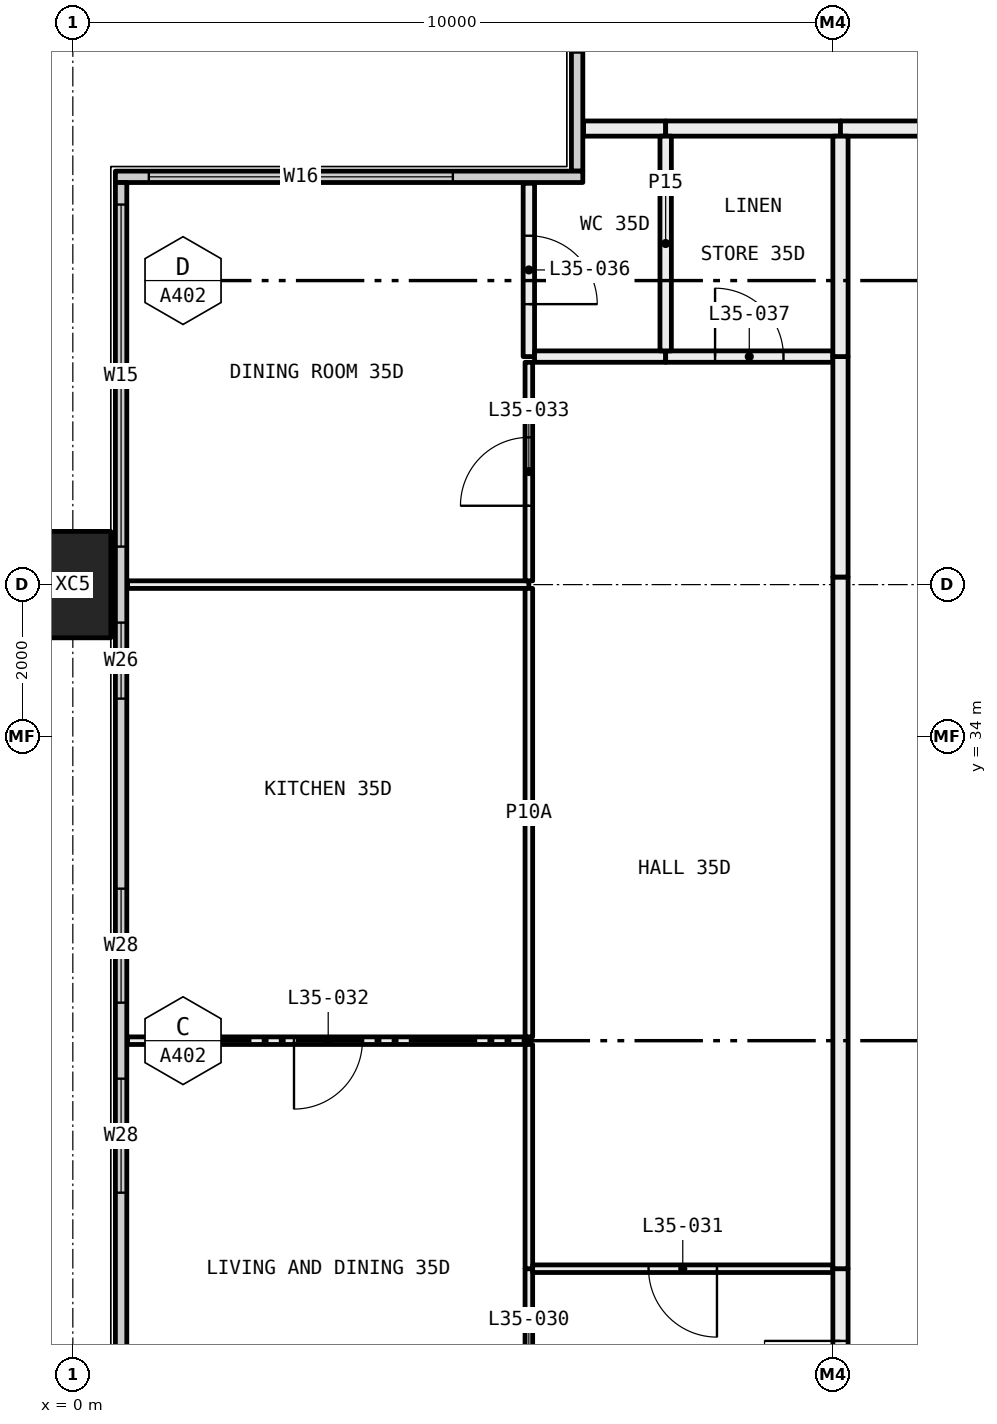
"""IFC4 building model, lengths in metres.
Left out: names, types, materials, properties, quantities, classifications, styles, units other than length and angle.
Written with IfcOpenShell. Run it as: python <this file> out.ifc"""

import sys

from ifc_helpers import new_model, si_unit, direction, frame, frame_2d, origin, origin_2d, place, context, subcontext, project, spatial, rectangle, hollow_rectangle, extrude, element, fill, save


model = new_model("IFC4")
c1 = context("Model", 3, precision=1e-05, world=origin(), true_north=direction((0.0, 1.0)))
c2 = subcontext(c1, "Body", "Model", "MODEL_VIEW")
j1 = project(units=[si_unit("LENGTHUNIT", "METRE"), si_unit("PLANEANGLEUNIT", "RADIAN")], contexts=[c1])
p1 = place(None, origin())
s1 = spatial("IfcSite", under=j1, at=p1, CompositionType="ELEMENT")
p2 = place(p1, origin())
s2 = spatial("IfcBuilding", under=s1, at=p2, CompositionType="ELEMENT")
p3 = place(p2, frame((0.0, 0.0, 134.55)))
s3 = spatial("IfcBuildingStorey", under=s2, at=p3, CompositionType="ELEMENT", Elevation=134.55)
p4 = place(p3, frame((0.0, 36.0, -0.4), z_axis=(0.0, 0.0, 1.0), x_axis=(0.0, 1.0, 0.0)))
e1 = element("IfcColumn", 1, at=p4, inside=s3, PredefinedType="COLUMN", context=c2, shape_type="SweptSolid", body=[
    extrude(hollow_rectangle(XDim=1.4, YDim=1.0, WallThickness=0.055, at=origin_2d()), origin(), (0.0, 0.0, 1.0), 3.45),
])
p5 = place(p3, frame((6.635, 41.44, 0.0), z_axis=(0.0, 0.0, 1.0), x_axis=(0.0, 1.0, 0.0)))
e2 = element("IfcWall", 2, at=p5, inside=s3, PredefinedType="ELEMENTEDWALL", context=c2, shape_type="SweptSolid", body=[
    extrude(rectangle(XDim=5.85, YDim=0.15, at=frame_2d((2.925, 0.0))), origin(), (0.0, 0.0, 1.0), 3.05),
])
p6 = place(p5, frame((1.56, 0.0, 0.45)))
e3 = element("IfcOpeningElement", 3, at=p6, cuts=e2, PredefinedType="OPENING", context=c2, shape_type="SweptSolid", body=[
    extrude(rectangle(XDim=4.0, YDim=2.55, at=frame_2d((2.0, 1.275))), frame((0.0, 0.085, 0.0), z_axis=(0.0, -1.0, 0.0), x_axis=(1.0, 0.0, 0.0)), (0.0, 0.0, 1.0), 0.17),
])
p7 = place(p3, frame((0.56, 41.365, 0.0), z_axis=(0.0, 0.0, 1.0), x_axis=(1.0, 0.0, 0.0)))
e4 = element("IfcWall", 4, at=p7, inside=s3, PredefinedType="ELEMENTEDWALL", context=c2, shape_type="SweptSolid", body=[
    extrude(rectangle(XDim=6.15, YDim=0.15, at=frame_2d((3.075, 0.0))), origin(), (0.0, 0.0, 1.0), 3.05),
])
p8 = place(p7, frame((0.44, 0.0, 0.45)))
e5 = element("IfcOpeningElement", 5, at=p8, cuts=e4, PredefinedType="OPENING", context=c2, shape_type="SweptSolid", body=[
    extrude(rectangle(XDim=4.0, YDim=2.55, at=frame_2d((2.0, 1.275))), frame((0.0, 0.085, 0.0), z_axis=(0.0, -1.0, 0.0), x_axis=(1.0, 0.0, 0.0)), (0.0, 0.0, 1.0), 0.17),
])
p9 = place(p3, frame((0.635, 18.71, 0.0), z_axis=(0.0, 0.0, 1.0), x_axis=(0.0, 1.0, 0.0)))
e6 = element("IfcWall", 6, at=p9, inside=s3, PredefinedType="ELEMENTEDWALL", context=c2, shape_type="SweptSolid", body=[
    extrude(rectangle(XDim=22.58, YDim=0.15, at=frame_2d((11.29, 0.0))), origin(), (0.0, 0.0, 1.0), 3.05),
])
p10 = place(p9, frame((0.29, 0.0, 0.45)))
e7 = element("IfcOpeningElement", 7, at=p10, cuts=e6, PredefinedType="OPENING", context=c2, shape_type="SweptSolid", body=[
    extrude(rectangle(XDim=4.5, YDim=2.55, at=frame_2d((2.25, 1.275))), frame((0.0, 0.085, 0.0), z_axis=(0.0, -1.0, 0.0), x_axis=(1.0, 0.0, 0.0)), (0.0, 0.0, 1.0), 0.17),
])
p11 = place(p9, frame((5.79, 0.0, 0.45)))
e8 = element("IfcOpeningElement", 8, at=p11, cuts=e6, PredefinedType="OPENING", context=c2, shape_type="SweptSolid", body=[
    extrude(rectangle(XDim=1.0, YDim=2.55, at=frame_2d((0.5, 1.275))), frame((0.0, 0.085, 0.0), z_axis=(0.0, -1.0, 0.0), x_axis=(1.0, 0.0, 0.0)), (0.0, 0.0, 1.0), 0.17),
])
p12 = place(p9, frame((9.29, 0.0, 0.45)))
e9 = element("IfcOpeningElement", 9, at=p12, cuts=e6, PredefinedType="OPENING", context=c2, shape_type="SweptSolid", body=[
    extrude(rectangle(XDim=1.5, YDim=2.55, at=frame_2d((0.75, 1.275))), frame((0.0, 0.085, 0.0), z_axis=(0.0, -1.0, 0.0), x_axis=(1.0, 0.0, 0.0)), (0.0, 0.0, 1.0), 0.17),
])
p13 = place(p9, frame((11.79, 0.0, 0.45)))
e10 = element("IfcOpeningElement", 10, at=p13, cuts=e6, PredefinedType="OPENING", context=c2, shape_type="SweptSolid", body=[
    extrude(rectangle(XDim=1.5, YDim=2.55, at=frame_2d((0.75, 1.275))), frame((0.0, 0.085, 0.0), z_axis=(0.0, -1.0, 0.0), x_axis=(1.0, 0.0, 0.0)), (0.0, 0.0, 1.0), 0.17),
])
p14 = place(p9, frame((15.79, 0.0, 0.45)))
e11 = element("IfcOpeningElement", 11, at=p14, cuts=e6, PredefinedType="OPENING", context=c2, shape_type="SweptSolid", body=[
    extrude(rectangle(XDim=1.0, YDim=2.55, at=frame_2d((0.5, 1.275))), frame((0.0, 0.085, 0.0), z_axis=(0.0, -1.0, 0.0), x_axis=(1.0, 0.0, 0.0)), (0.0, 0.0, 1.0), 0.17),
])
p15 = place(p9, frame((17.79, 0.0, 0.45)))
e12 = element("IfcOpeningElement", 12, at=p15, cuts=e6, PredefinedType="OPENING", context=c2, shape_type="SweptSolid", body=[
    extrude(rectangle(XDim=4.5, YDim=2.55, at=frame_2d((2.25, 1.275))), frame((0.0, 0.085, 0.0), z_axis=(0.0, -1.0, 0.0), x_axis=(1.0, 0.0, 0.0)), (0.0, 0.0, 1.0), 0.17),
])
p16 = place(p3, frame((6.72, 42.0, 0.0), z_axis=(0.0, 0.0, 1.0), x_axis=(1.0, 0.0, 0.0)))
e13 = element("IfcWall", 13, at=p16, inside=s3, PredefinedType="PARTITIONING", context=c2, shape_type="SweptSolid", body=[
    extrude(rectangle(XDim=1.08, YDim=0.2, at=frame_2d((0.54, 0.0))), origin(), (0.0, 0.0, 1.0), 3.05),
])
p17 = place(p3, frame((7.8, 42.0, 0.0), z_axis=(0.0, 0.0, 1.0), x_axis=(1.0, 0.0, 0.0)))
e14 = element("IfcWall", 14, at=p17, inside=s3, PredefinedType="PARTITIONING", context=c2, shape_type="SweptSolid", body=[
    extrude(rectangle(XDim=2.3, YDim=0.2, at=frame_2d((1.15, 0.0))), origin(), (0.0, 0.0, 1.0), 3.05),
])
p18 = place(p3, frame((10.1, 42.0, 0.0), z_axis=(0.0, 0.0, 1.0), x_axis=(1.0, 0.0, 0.0)))
e15 = element("IfcWall", 15, at=p18, inside=s3, PredefinedType="PARTITIONING", context=c2, shape_type="SweptSolid", body=[
    extrude(rectangle(XDim=1.9, YDim=0.2, at=frame_2d((0.95, 0.0))), origin(), (0.0, 0.0, 1.0), 3.05),
])
p19 = place(p3, frame((6.0, 30.0, 0.0), z_axis=(0.0, 0.0, 1.0), x_axis=(-1.0, 0.0, 0.0)))
e16 = element("IfcWall", 16, at=p19, inside=s3, PredefinedType="PARTITIONING", context=c2, shape_type="SweptSolid", body=[
    extrude(rectangle(XDim=5.28, YDim=0.1, at=frame_2d((2.64, 0.0))), origin(), (0.0, 0.0, 1.0), 3.05),
])
p20 = place(p19, frame((2.19, 0.0, 0.0)))
e17 = element("IfcOpeningElement", 17, at=p20, cuts=e16, PredefinedType="OPENING", context=c2, shape_type="SweptSolid", body=[
    extrude(rectangle(XDim=0.9, YDim=2.1, at=frame_2d((0.45, 1.05))), frame((0.0, 0.06, 0.0), z_axis=(0.0, -1.0, 0.0), x_axis=(1.0, 0.0, 0.0)), (0.0, 0.0, 1.0), 0.12),
])
p21 = place(p3, frame((6.0, 24.05, 0.0), z_axis=(0.0, 0.0, 1.0), x_axis=(0.0, 1.0, 0.0)))
e18 = element("IfcWall", 18, at=p21, inside=s3, PredefinedType="PARTITIONING", context=c2, shape_type="SweptSolid", body=[
    extrude(rectangle(XDim=2.95, YDim=0.1, at=frame_2d((1.475, 0.0))), origin(), (0.0, 0.0, 1.0), 2.45),
])
p22 = place(p21, frame((1.025, 0.0, 0.0)))
e19 = element("IfcOpeningElement", 19, at=p22, cuts=e18, PredefinedType="OPENING", context=c2, shape_type="SweptSolid", body=[
    extrude(rectangle(XDim=0.9, YDim=2.1, at=frame_2d((0.45, 1.05))), frame((0.0, 0.06, 0.0), z_axis=(0.0, -1.0, 0.0), x_axis=(1.0, 0.0, 0.0)), (0.0, 0.0, 1.0), 0.12),
])
p23 = place(p3, frame((6.0, 27.0, 0.0), z_axis=(0.0, 0.0, 1.0), x_axis=(0.0, 1.0, 0.0)))
e20 = element("IfcWall", 20, at=p23, inside=s3, PredefinedType="PARTITIONING", context=c2, shape_type="SweptSolid", body=[
    extrude(rectangle(XDim=2.95, YDim=0.1, at=frame_2d((1.475, 0.0))), origin(), (0.0, 0.0, 1.0), 3.05),
])
p24 = place(p3, frame((6.0, 36.0, 0.0), z_axis=(0.0, 0.0, 1.0), x_axis=(-1.0, 0.0, 0.0)))
e21 = element("IfcWall", 21, at=p24, inside=s3, PredefinedType="PARTITIONING", context=c2, shape_type="SweptSolid", body=[
    extrude(rectangle(XDim=5.28, YDim=0.1, at=frame_2d((2.64, 0.0))), origin(), (0.0, 0.0, 1.0), 2.45),
])
p25 = place(p3, frame((6.0, 30.05, 0.0), z_axis=(0.0, 0.0, 1.0), x_axis=(0.0, 1.0, 0.0)))
e22 = element("IfcWall", 22, at=p25, inside=s3, PredefinedType="PARTITIONING", context=c2, shape_type="SweptSolid", body=[
    extrude(rectangle(XDim=5.9, YDim=0.1, at=frame_2d((2.95, 0.0))), origin(), (0.0, 0.0, 1.0), 2.45),
])
p26 = place(p3, frame((6.0, 36.05, 0.0), z_axis=(0.0, 0.0, 1.0), x_axis=(0.0, 1.0, 0.0)))
e23 = element("IfcWall", 23, at=p26, inside=s3, PredefinedType="PARTITIONING", context=c2, shape_type="SweptSolid", body=[
    extrude(rectangle(XDim=2.875, YDim=0.1, at=frame_2d((1.438, 0.0))), origin(), (0.0, 0.0, 1.0), 2.45),
])
p27 = place(p26, frame((0.988, 0.0, 0.0)))
e24 = element("IfcOpeningElement", 24, at=p27, cuts=e23, PredefinedType="OPENING", context=c2, shape_type="SweptSolid", body=[
    extrude(rectangle(XDim=0.9, YDim=2.1, at=frame_2d((0.45, 1.05))), frame((0.0, 0.06, 0.0), z_axis=(0.0, -1.0, 0.0), x_axis=(1.0, 0.0, 0.0)), (0.0, 0.0, 1.0), 0.12),
])
p28 = place(p3, frame((6.0, 39.0, 0.0), z_axis=(0.0, 0.0, 1.0), x_axis=(0.0, 1.0, 0.0)))
e25 = element("IfcWall", 25, at=p28, inside=s3, PredefinedType="PARTITIONING", context=c2, shape_type="SweptSolid", body=[
    extrude(rectangle(XDim=2.28, YDim=0.15, at=frame_2d((1.14, 0.0))), origin(), (0.0, 0.0, 1.0), 3.05),
])
p29 = place(p28, frame((0.69, 0.0, 0.0)))
e26 = element("IfcOpeningElement", 26, at=p29, cuts=e25, PredefinedType="OPENING", context=c2, shape_type="SweptSolid", body=[
    extrude(rectangle(XDim=0.9, YDim=2.1, at=frame_2d((0.45, 1.05))), frame((0.0, 0.085, 0.0), z_axis=(0.0, -1.0, 0.0), x_axis=(1.0, 0.0, 0.0)), (0.0, 0.0, 1.0), 0.17),
])
p30 = place(p3, frame((10.0, 27.0, 0.0), z_axis=(0.0, 0.0, 1.0), x_axis=(-1.0, 0.0, 0.0)))
e27 = element("IfcWall", 27, at=p30, inside=s3, PredefinedType="PARTITIONING", context=c2, shape_type="SweptSolid", body=[
    extrude(rectangle(XDim=3.95, YDim=0.1, at=frame_2d((1.975, 0.0))), origin(), (0.0, 0.0, 1.0), 3.05),
])
p31 = place(p30, frame((1.525, 0.0, 0.0)))
e28 = element("IfcOpeningElement", 28, at=p31, cuts=e27, PredefinedType="OPENING", context=c2, shape_type="SweptSolid", body=[
    extrude(rectangle(XDim=0.9, YDim=2.1, at=frame_2d((0.45, 1.05))), frame((0.0, 0.06, 0.0), z_axis=(0.0, -1.0, 0.0), x_axis=(1.0, 0.0, 0.0)), (0.0, 0.0, 1.0), 0.12),
])
p32 = place(p3, frame((10.1, 24.1, 0.0), z_axis=(0.0, 0.0, 1.0), x_axis=(0.0, 1.0, 0.0)))
e29 = element("IfcWall", 29, at=p32, inside=s3, PredefinedType="PARTITIONING", context=c2, shape_type="SweptSolid", body=[
    extrude(rectangle(XDim=2.9, YDim=0.2, at=frame_2d((1.45, 0.0))), origin(), (0.0, 0.0, 1.0), 3.05),
])
p33 = place(p32, frame((0.95, 0.0, 0.0)))
e30 = element("IfcOpeningElement", 30, at=p33, cuts=e29, PredefinedType="OPENING", context=c2, shape_type="SweptSolid", body=[
    extrude(rectangle(XDim=1.0, YDim=2.1, at=frame_2d((0.5, 1.05))), frame((0.0, 0.11, 0.0), z_axis=(0.0, -1.0, 0.0), x_axis=(1.0, 0.0, 0.0)), (0.0, 0.0, 1.0), 0.22),
])
p34 = place(p3, frame((7.8, 39.0, 0.0), z_axis=(0.0, 0.0, 1.0), x_axis=(-1.0, 0.0, 0.0)))
e31 = element("IfcWall", 31, at=p34, inside=s3, PredefinedType="PARTITIONING", context=c2, shape_type="SweptSolid", body=[
    extrude(rectangle(XDim=1.725, YDim=0.15, at=frame_2d((0.863, 0.0))), origin(), (0.0, 0.0, 1.0), 3.05),
])
p35 = place(p3, frame((10.0, 39.0, 0.0), z_axis=(0.0, 0.0, 1.0), x_axis=(-1.0, 0.0, 0.0)))
e32 = element("IfcWall", 32, at=p35, inside=s3, PredefinedType="PARTITIONING", context=c2, shape_type="SweptSolid", body=[
    extrude(rectangle(XDim=2.2, YDim=0.15, at=frame_2d((1.1, 0.0))), origin(), (0.0, 0.0, 1.0), 3.05),
])
p36 = place(p35, frame((0.65, 0.0, 0.0)))
e33 = element("IfcOpeningElement", 33, at=p36, cuts=e32, PredefinedType="OPENING", context=c2, shape_type="SweptSolid", body=[
    extrude(rectangle(XDim=0.9, YDim=2.1, at=frame_2d((0.45, 1.05))), frame((0.0, 0.085, 0.0), z_axis=(0.0, -1.0, 0.0), x_axis=(1.0, 0.0, 0.0)), (0.0, 0.0, 1.0), 0.17),
])
p37 = place(p3, frame((10.1, 27.0, 0.0), z_axis=(0.0, 0.0, 1.0), x_axis=(0.0, 1.0, 0.0)))
e34 = element("IfcWall", 34, at=p37, inside=s3, PredefinedType="PARTITIONING", context=c2, shape_type="SweptSolid", body=[
    extrude(rectangle(XDim=9.1, YDim=0.2, at=frame_2d((4.55, 0.0))), origin(), (0.0, 0.0, 1.0), 2.45),
])
p38 = place(p3, frame((10.1, 36.1, 0.0), z_axis=(0.0, 0.0, 1.0), x_axis=(0.0, 1.0, 0.0)))
e35 = element("IfcWall", 35, at=p38, inside=s3, PredefinedType="PARTITIONING", context=c2, shape_type="SweptSolid", body=[
    extrude(rectangle(XDim=2.9, YDim=0.2, at=frame_2d((1.45, 0.0))), origin(), (0.0, 0.0, 1.0), 3.05),
])
p39 = place(p3, frame((7.8, 39.075, 0.0), z_axis=(0.0, 0.0, 1.0), x_axis=(0.0, 1.0, 0.0)))
e36 = element("IfcWall", 36, at=p39, inside=s3, PredefinedType="PARTITIONING", context=c2, shape_type="SweptSolid", body=[
    extrude(rectangle(XDim=2.825, YDim=0.15, at=frame_2d((1.413, 0.0))), origin(), (0.0, 0.0, 1.0), 3.05),
])
p40 = place(p3, frame((10.1, 39.0, 0.0), z_axis=(0.0, 0.0, 1.0), x_axis=(0.0, 1.0, 0.0)))
e37 = element("IfcWall", 37, at=p40, inside=s3, PredefinedType="PARTITIONING", context=c2, shape_type="SweptSolid", body=[
    extrude(rectangle(XDim=2.9, YDim=0.2, at=frame_2d((1.45, 0.0))), origin(), (0.0, 0.0, 1.0), 3.05),
])
p41 = place(p8, origin())
e38 = element("IfcWindow", 38, at=p41, inside=s3, PartitioningType="SINGLE_PANEL", PredefinedType="WINDOW", context=c2, shape_type="SweptSolid", body=[
    extrude(rectangle(XDim=4.0, YDim=2.55, at=frame_2d((2.0, 1.275))), frame((0.0, 0.03, 0.0), z_axis=(0.0, -1.0, 0.0), x_axis=(1.0, 0.0, 0.0)), (0.0, 0.0, 1.0), 0.06),
])
fill(e5, e38)
p42 = place(p12, origin())
e39 = element("IfcWindow", 39, at=p42, inside=s3, PartitioningType="SINGLE_PANEL", PredefinedType="WINDOW", context=c2, shape_type="SweptSolid", body=[
    extrude(rectangle(XDim=1.5, YDim=2.55, at=frame_2d((0.75, 1.275))), frame((0.0, 0.03, 0.0), z_axis=(0.0, -1.0, 0.0), x_axis=(1.0, 0.0, 0.0)), (0.0, 0.0, 1.0), 0.06),
])
fill(e9, e39)
p43 = place(p13, origin())
e40 = element("IfcWindow", 40, at=p43, inside=s3, PartitioningType="SINGLE_PANEL", PredefinedType="WINDOW", context=c2, shape_type="SweptSolid", body=[
    extrude(rectangle(XDim=1.5, YDim=2.55, at=frame_2d((0.75, 1.275))), frame((0.0, 0.03, 0.0), z_axis=(0.0, -1.0, 0.0), x_axis=(1.0, 0.0, 0.0)), (0.0, 0.0, 1.0), 0.06),
])
fill(e10, e40)
p44 = place(p14, origin())
e41 = element("IfcWindow", 41, at=p44, inside=s3, PartitioningType="SINGLE_PANEL", PredefinedType="WINDOW", context=c2, shape_type="SweptSolid", body=[
    extrude(rectangle(XDim=1.0, YDim=2.55, at=frame_2d((0.5, 1.275))), frame((0.0, 0.03, 0.0), z_axis=(0.0, -1.0, 0.0), x_axis=(1.0, 0.0, 0.0)), (0.0, 0.0, 1.0), 0.06),
])
fill(e11, e41)
p45 = place(p15, origin())
e42 = element("IfcWindow", 42, at=p45, inside=s3, PartitioningType="SINGLE_PANEL", PredefinedType="WINDOW", context=c2, shape_type="SweptSolid", body=[
    extrude(rectangle(XDim=4.5, YDim=2.55, at=frame_2d((2.25, 1.275))), frame((0.0, 0.03, 0.0), z_axis=(0.0, -1.0, 0.0), x_axis=(1.0, 0.0, 0.0)), (0.0, 0.0, 1.0), 0.06),
])
fill(e12, e42)
p46 = place(p33, origin())
e43 = element("IfcDoor", 43, at=p46, inside=s3, OperationType="SINGLE_SWING_LEFT", PredefinedType="DOOR", context=c2, shape_type="SweptSolid", body=[
    extrude(rectangle(XDim=1.0, YDim=2.1, at=frame_2d((0.5, 1.05))), frame((0.0, 0.025, 0.0), z_axis=(0.0, -1.0, 0.0), x_axis=(1.0, 0.0, 0.0)), (0.0, 0.0, 1.0), 0.05),
])
fill(e30, e43)
p47 = place(p31, origin())
e44 = element("IfcDoor", 44, at=p47, inside=s3, OperationType="SINGLE_SWING_RIGHT", PredefinedType="DOOR", context=c2, shape_type="SweptSolid", body=[
    extrude(rectangle(XDim=0.9, YDim=2.1, at=frame_2d((0.45, 1.05))), frame((0.0, 0.025, 0.0), z_axis=(0.0, -1.0, 0.0), x_axis=(1.0, 0.0, 0.0)), (0.0, 0.0, 1.0), 0.05),
])
fill(e28, e44)
p48 = place(p20, origin())
e45 = element("IfcDoor", 45, at=p48, inside=s3, OperationType="SINGLE_SWING_LEFT", PredefinedType="DOOR", context=c2, shape_type="SweptSolid", body=[
    extrude(rectangle(XDim=0.9, YDim=2.1, at=frame_2d((0.45, 1.05))), frame((0.0, 0.025, 0.0), z_axis=(0.0, -1.0, 0.0), x_axis=(1.0, 0.0, 0.0)), (0.0, 0.0, 1.0), 0.05),
])
fill(e17, e45)
p49 = place(p27, origin())
e46 = element("IfcDoor", 46, at=p49, inside=s3, OperationType="SINGLE_SWING_RIGHT", PredefinedType="DOOR", context=c2, shape_type="SweptSolid", body=[
    extrude(rectangle(XDim=0.9, YDim=2.1, at=frame_2d((0.45, 1.05))), frame((0.0, 0.025, 0.0), z_axis=(0.0, -1.0, 0.0), x_axis=(1.0, 0.0, 0.0)), (0.0, 0.0, 1.0), 0.05),
])
fill(e24, e46)
p50 = place(p29, frame((0.9, 0.0, 0.0), x_axis=(-1.0, 0.0, 0.0)))
e47 = element("IfcDoor", 47, at=p50, inside=s3, OperationType="SINGLE_SWING_LEFT", PredefinedType="DOOR", context=c2, shape_type="SweptSolid", body=[
    extrude(rectangle(XDim=0.9, YDim=2.1, at=frame_2d((0.45, 1.05))), frame((0.0, 0.025, 0.0), z_axis=(0.0, -1.0, 0.0), x_axis=(1.0, 0.0, 0.0)), (0.0, 0.0, 1.0), 0.05),
])
fill(e26, e47)
p51 = place(p36, frame((0.9, 0.0, 0.0), x_axis=(-1.0, 0.0, 0.0)))
e48 = element("IfcDoor", 48, at=p51, inside=s3, OperationType="SINGLE_SWING_RIGHT", PredefinedType="DOOR", context=c2, shape_type="SweptSolid", body=[
    extrude(rectangle(XDim=0.9, YDim=2.1, at=frame_2d((0.45, 1.05))), frame((0.0, 0.025, 0.0), z_axis=(0.0, -1.0, 0.0), x_axis=(1.0, 0.0, 0.0)), (0.0, 0.0, 1.0), 0.05),
])
fill(e33, e48)
save(model, sys.argv[1])
